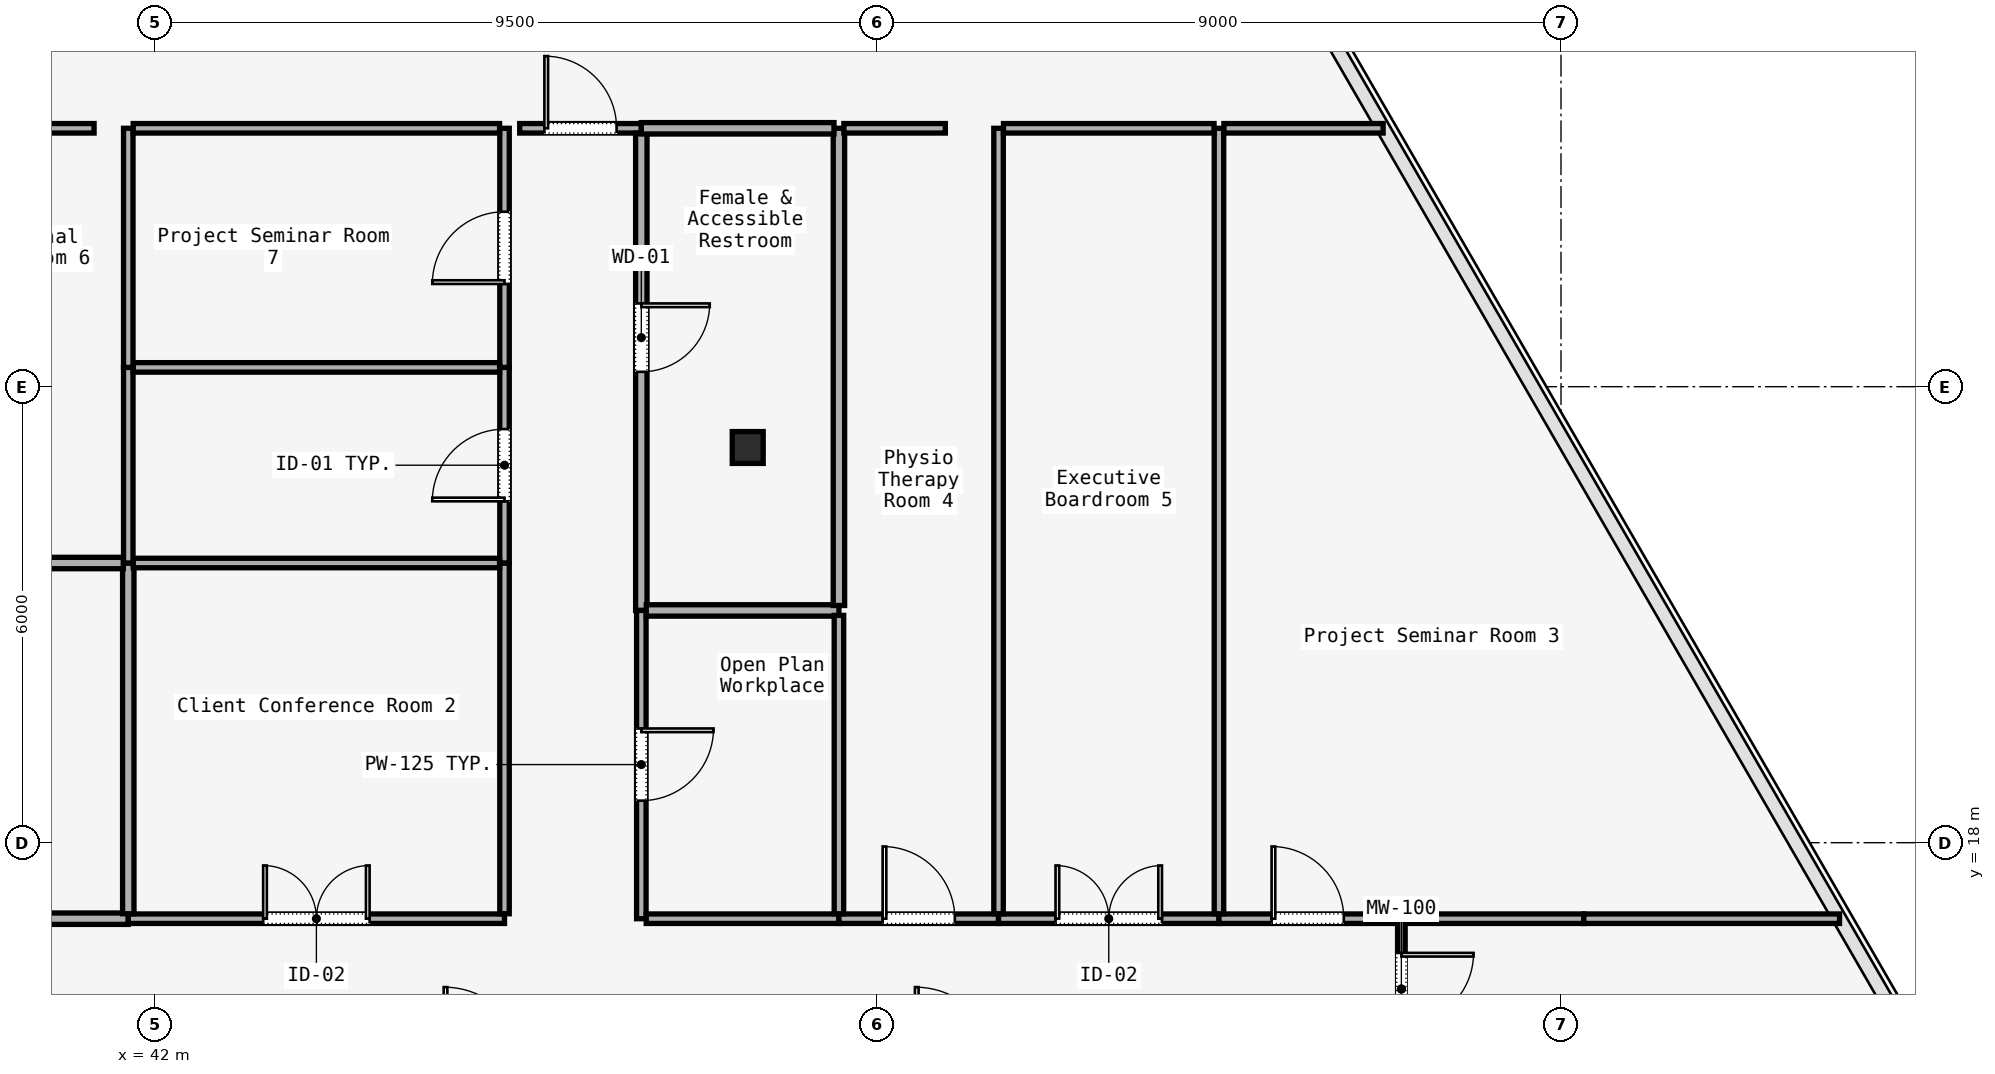
"""IFC4 building model, lengths in metres.
Left out: names, types, materials, properties, quantities, classifications, styles, units other than length and angle.
Written with IfcOpenShell. Run it as: python <this file> out.ifc"""

import sys

from ifc_helpers import new_model, si_unit, direction, frame, frame_2d, origin, origin_2d, place, context, subcontext, project, spatial, rectangle, i_section, extrude, element, fill, save


model = new_model("IFC4")
c1 = context("Model", 3, precision=1e-05, world=origin(), true_north=direction((0.0, 1.0)))
c2 = subcontext(c1, "Body", "Model", "MODEL_VIEW")
j1 = project(units=[si_unit("LENGTHUNIT", "METRE"), si_unit("PLANEANGLEUNIT", "RADIAN")], contexts=[c1])
p1 = place(None, origin())
s1 = spatial("IfcSite", under=j1, at=p1, CompositionType="ELEMENT")
p2 = place(p1, origin())
s2 = spatial("IfcBuilding", under=s1, at=p2, CompositionType="ELEMENT")
p3 = place(p2, frame((0.0, 0.0, 165.0)))
s3 = spatial("IfcBuildingStorey", under=s2, at=p3, CompositionType="ELEMENT", Elevation=165.0)
p4 = place(p3, frame((49.8, 23.2, 0.0), z_axis=(0.0, 0.0, 1.0), x_axis=(1.0, 0.0, 0.0)))
e1 = element("IfcColumn", 1, at=p4, inside=s3, PredefinedType="COLUMN", context=c2, shape_type="SweptSolid", body=[
    extrude(i_section(OverallWidth=0.407, OverallDepth=0.419, WebThickness=0.031, FlangeThickness=0.049, FilletRadius=0.015, at=origin_2d()), origin(), (0.0, 0.0, 1.0), 3.58),
])
p5 = place(p3, frame((58.4, 17.0, 0.0), z_axis=(0.0, 0.0, 1.0), x_axis=(0.0, -1.0, 0.0)))
e2 = element("IfcWall", 2, at=p5, inside=s3, PredefinedType="MOVABLE", context=c2, shape_type="SweptSolid", body=[
    extrude(rectangle(XDim=1.85, YDim=0.1, at=frame_2d((0.925, 0.0))), origin(), (0.0, 0.0, 1.0), 3.01),
])
p6 = place(p5, frame((0.45, 0.0, 0.0)))
e3 = element("IfcOpeningElement", 3, at=p6, cuts=e2, PredefinedType="OPENING", context=c2, shape_type="SweptSolid", body=[
    extrude(rectangle(XDim=0.95, YDim=2.2, at=frame_2d((0.475, 1.1))), frame((0.0, 0.05, 0.0), z_axis=(0.0, -1.0, 0.0), x_axis=(1.0, 0.0, 0.0)), (0.0, 0.0, 1.0), 0.1),
])
p7 = place(p3, frame((37.665, 17.0, 0.0), z_axis=(0.0, 0.0, 1.0), x_axis=(1.0, 0.0, 0.0)))
e4 = element("IfcWall", 4, at=p7, inside=s3, PredefinedType="PARTITIONING", context=c2, shape_type="SweptSolid", body=[
    extrude(rectangle(XDim=3.985, YDim=0.15, at=frame_2d((1.992, 0.0))), origin(), (0.0, 0.0, 1.0), 3.01),
])
p8 = place(p3, frame((41.65, 17.0, 0.0), z_axis=(0.0, 0.0, 1.0), x_axis=(1.0, 0.0, 0.0)))
e5 = element("IfcWall", 5, at=p8, inside=s3, PredefinedType="PARTITIONING", context=c2, shape_type="SweptSolid", body=[
    extrude(rectangle(XDim=4.95, YDim=0.125, at=frame_2d((2.475, 0.0))), origin(), (0.0, 0.0, 1.0), 3.01),
])
p9 = place(p8, frame((1.775, 0.0, 0.0)))
e6 = element("IfcOpeningElement", 6, at=p9, cuts=e5, PredefinedType="OPENING", context=c2, shape_type="SweptSolid", body=[
    extrude(rectangle(XDim=1.4, YDim=2.2, at=frame_2d((0.7, 1.1))), frame((0.0, 0.062, 0.0), z_axis=(0.0, -1.0, 0.0), x_axis=(1.0, 0.0, 0.0)), (0.0, 0.0, 1.0), 0.125),
])
p10 = place(p3, frame((46.6, 17.065, 0.0), z_axis=(0.0, 0.0, 1.0), x_axis=(0.0, 1.0, 0.0)))
e7 = element("IfcWall", 7, at=p10, inside=s3, PredefinedType="PARTITIONING", context=c2, shape_type="SweptSolid", body=[
    extrude(rectangle(XDim=4.615, YDim=0.125, at=frame_2d((2.308, 0.0))), origin(), (0.0, 0.0, 1.0), 3.01),
])
p11 = place(p3, frame((46.6, 21.68, 0.0), z_axis=(0.0, 0.0, 1.0), x_axis=(0.0, 1.0, 0.0)))
e8 = element("IfcWall", 8, at=p11, inside=s3, PredefinedType="PARTITIONING", context=c2, shape_type="SweptSolid", body=[
    extrude(rectangle(XDim=2.574, YDim=0.125, at=frame_2d((1.287, 0.0))), origin(), (0.0, 0.0, 1.0), 3.01),
])
p12 = place(p11, frame((0.812, 0.0, 0.0)))
e9 = element("IfcOpeningElement", 9, at=p12, cuts=e8, PredefinedType="OPENING", context=c2, shape_type="SweptSolid", body=[
    extrude(rectangle(XDim=0.95, YDim=2.2, at=frame_2d((0.475, 1.1))), frame((0.0, 0.062, 0.0), z_axis=(0.0, -1.0, 0.0), x_axis=(1.0, 0.0, 0.0)), (0.0, 0.0, 1.0), 0.125),
])
p13 = place(p3, frame((46.6, 24.254, 0.0), z_axis=(0.0, 0.0, 1.0), x_axis=(0.0, 1.0, 0.0)))
e10 = element("IfcWall", 10, at=p13, inside=s3, PredefinedType="PARTITIONING", context=c2, shape_type="SweptSolid", body=[
    extrude(rectangle(XDim=3.146, YDim=0.125, at=frame_2d((1.573, 0.0))), origin(), (0.0, 0.0, 1.0), 3.01),
])
p14 = place(p13, frame((1.098, 0.0, 0.0)))
e11 = element("IfcOpeningElement", 11, at=p14, cuts=e10, PredefinedType="OPENING", context=c2, shape_type="SweptSolid", body=[
    extrude(rectangle(XDim=0.95, YDim=2.2, at=frame_2d((0.475, 1.1))), frame((0.0, 0.062, 0.0), z_axis=(0.0, -1.0, 0.0), x_axis=(1.0, 0.0, 0.0)), (0.0, 0.0, 1.0), 0.125),
])
p15 = place(p3, frame((46.8, 27.4, 0.0), z_axis=(0.0, 0.0, 1.0), x_axis=(1.0, 0.0, 0.0)))
e12 = element("IfcWall", 12, at=p15, inside=s3, PredefinedType="PARTITIONING", context=c2, shape_type="SweptSolid", body=[
    extrude(rectangle(XDim=1.6, YDim=0.125, at=frame_2d((0.8, 0.0))), origin(), (0.0, 0.0, 1.0), 3.01),
])
p16 = place(p15, frame((0.325, 0.0, 0.0)))
e13 = element("IfcOpeningElement", 13, at=p16, cuts=e12, PredefinedType="OPENING", context=c2, shape_type="SweptSolid", body=[
    extrude(rectangle(XDim=0.95, YDim=2.2, at=frame_2d((0.475, 1.1))), frame((0.0, 0.062, 0.0), z_axis=(0.0, -1.0, 0.0), x_axis=(1.0, 0.0, 0.0)), (0.0, 0.0, 1.0), 0.125),
])
p17 = place(p3, frame((48.4, 27.335, 0.0), z_axis=(0.0, 0.0, 1.0), x_axis=(0.0, -1.0, 0.0)))
e14 = element("IfcWall", 14, at=p17, inside=s3, PredefinedType="PARTITIONING", context=c2, shape_type="SweptSolid", body=[
    extrude(rectangle(XDim=6.279, YDim=0.15, at=frame_2d((3.14, 0.0))), origin(), (0.0, 0.0, 1.0), 3.01),
])
p18 = place(p17, frame((2.24, 0.0, 0.0)))
e15 = element("IfcOpeningElement", 15, at=p18, cuts=e14, PredefinedType="OPENING", context=c2, shape_type="SweptSolid", body=[
    extrude(rectangle(XDim=0.9, YDim=2.15, at=frame_2d((0.45, 1.075))), frame((0.0, 0.075, 0.0), z_axis=(0.0, -1.0, 0.0), x_axis=(1.0, 0.0, 0.0)), (0.0, 0.0, 1.0), 0.15),
])
p19 = place(p3, frame((48.4, 21.056, 0.0), z_axis=(0.0, 0.0, 1.0), x_axis=(0.0, -1.0, 0.0)))
e16 = element("IfcWall", 16, at=p19, inside=s3, PredefinedType="PARTITIONING", context=c2, shape_type="SweptSolid", body=[
    extrude(rectangle(XDim=4.056, YDim=0.125, at=frame_2d((2.028, 0.0))), origin(), (0.0, 0.0, 1.0), 3.01),
])
p20 = place(p19, frame((1.553, 0.0, 0.0)))
e17 = element("IfcOpeningElement", 17, at=p20, cuts=e16, PredefinedType="OPENING", context=c2, shape_type="SweptSolid", body=[
    extrude(rectangle(XDim=0.95, YDim=2.2, at=frame_2d((0.475, 1.1))), frame((0.0, 0.062, 0.0), z_axis=(0.0, -1.0, 0.0), x_axis=(1.0, 0.0, 0.0)), (0.0, 0.0, 1.0), 0.125),
])
p21 = place(p3, frame((48.465, 17.0, 0.0), z_axis=(0.0, 0.0, 1.0), x_axis=(1.0, 0.0, 0.0)))
e18 = element("IfcWall", 18, at=p21, inside=s3, PredefinedType="PARTITIONING", context=c2, shape_type="SweptSolid", body=[
    extrude(rectangle(XDim=2.535, YDim=0.125, at=frame_2d((1.268, 0.0))), origin(), (0.0, 0.0, 1.0), 3.01),
])
p22 = place(p3, frame((51.0, 17.0, 0.0), z_axis=(0.0, 0.0, 1.0), x_axis=(1.0, 0.0, 0.0)))
e19 = element("IfcWall", 19, at=p22, inside=s3, PredefinedType="PARTITIONING", context=c2, shape_type="SweptSolid", body=[
    extrude(rectangle(XDim=2.1, YDim=0.125, at=frame_2d((1.05, 0.0))), origin(), (0.0, 0.0, 1.0), 3.01),
])
p23 = place(p22, frame((0.575, 0.0, 0.0)))
e20 = element("IfcOpeningElement", 20, at=p23, cuts=e19, PredefinedType="OPENING", context=c2, shape_type="SweptSolid", body=[
    extrude(rectangle(XDim=0.95, YDim=2.2, at=frame_2d((0.475, 1.1))), frame((0.0, 0.062, 0.0), z_axis=(0.0, -1.0, 0.0), x_axis=(1.0, 0.0, 0.0)), (0.0, 0.0, 1.0), 0.125),
])
p24 = place(p3, frame((53.1, 17.0, 0.0), z_axis=(0.0, 0.0, 1.0), x_axis=(1.0, 0.0, 0.0)))
e21 = element("IfcWall", 21, at=p24, inside=s3, PredefinedType="PARTITIONING", context=c2, shape_type="SweptSolid", body=[
    extrude(rectangle(XDim=2.9, YDim=0.125, at=frame_2d((1.45, 0.0))), origin(), (0.0, 0.0, 1.0), 3.01),
])
p25 = place(p24, frame((0.75, 0.0, 0.0)))
e22 = element("IfcOpeningElement", 22, at=p25, cuts=e21, PredefinedType="OPENING", context=c2, shape_type="SweptSolid", body=[
    extrude(rectangle(XDim=1.4, YDim=2.2, at=frame_2d((0.7, 1.1))), frame((0.0, 0.062, 0.0), z_axis=(0.0, -1.0, 0.0), x_axis=(1.0, 0.0, 0.0)), (0.0, 0.0, 1.0), 0.125),
])
p26 = place(p3, frame((56.0, 17.0, 0.0), z_axis=(0.0, 0.0, 1.0), x_axis=(1.0, 0.0, 0.0)))
e23 = element("IfcWall", 23, at=p26, inside=s3, PredefinedType="PARTITIONING", context=c2, shape_type="SweptSolid", body=[
    extrude(rectangle(XDim=2.335, YDim=0.125, at=frame_2d((1.167, 0.0))), origin(), (0.0, 0.0, 1.0), 3.01),
])
p27 = place(p26, frame((0.692, 0.0, 0.0)))
e24 = element("IfcOpeningElement", 24, at=p27, cuts=e23, PredefinedType="OPENING", context=c2, shape_type="SweptSolid", body=[
    extrude(rectangle(XDim=0.95, YDim=2.2, at=frame_2d((0.475, 1.1))), frame((0.0, 0.062, 0.0), z_axis=(0.0, -1.0, 0.0), x_axis=(1.0, 0.0, 0.0)), (0.0, 0.0, 1.0), 0.125),
])
p28 = place(p3, frame((58.465, 17.0, 0.0), z_axis=(0.0, 0.0, 1.0), x_axis=(1.0, 0.0, 0.0)))
e25 = element("IfcWall", 25, at=p28, inside=s3, PredefinedType="PARTITIONING", context=c2, shape_type="SweptSolid", body=[
    extrude(rectangle(XDim=2.335, YDim=0.125, at=frame_2d((1.167, 0.0))), origin(), (0.0, 0.0, 1.0), 3.01),
])
p29 = place(p3, frame((60.8, 17.0, 0.0), z_axis=(0.0, 0.0, 1.0), x_axis=(1.0, 0.0, 0.0)))
e26 = element("IfcWall", 26, at=p29, inside=s3, PredefinedType="PARTITIONING", context=c2, shape_type="SweptSolid", body=[
    extrude(rectangle(XDim=3.365, YDim=0.125, at=frame_2d((1.682, 0.0))), origin(), (0.0, 0.0, 1.0), 3.01),
])
p30 = place(p3, frame((48.465, 21.056, 0.0), z_axis=(0.0, 0.0, 1.0), x_axis=(1.0, 0.0, 0.0)))
e27 = element("IfcWall", 27, at=p30, inside=s3, PredefinedType="PARTITIONING", context=c2, shape_type="SweptSolid", body=[
    extrude(rectangle(XDim=2.535, YDim=0.15, at=frame_2d((1.268, 0.0))), origin(), (0.0, 0.0, 1.0), 3.01),
])
p31 = place(p3, frame((51.0, 20.991, 0.0), z_axis=(0.0, 0.0, 1.0), x_axis=(0.0, -1.0, 0.0)))
e28 = element("IfcWall", 28, at=p31, inside=s3, PredefinedType="PARTITIONING", context=c2, shape_type="SweptSolid", body=[
    extrude(rectangle(XDim=3.926, YDim=0.125, at=frame_2d((1.963, 0.0))), origin(), (0.0, 0.0, 1.0), 3.01),
])
p32 = place(p3, frame((41.65, 21.68, 0.0), z_axis=(0.0, 0.0, 1.0), x_axis=(0.0, -1.0, 0.0)))
e29 = element("IfcWall", 29, at=p32, inside=s3, PredefinedType="PARTITIONING", context=c2, shape_type="SweptSolid", body=[
    extrude(rectangle(XDim=4.615, YDim=0.15, at=frame_2d((2.308, 0.0))), origin(), (0.0, 0.0, 1.0), 3.01),
])
p33 = place(p3, frame((37.665, 21.68, 0.0), z_axis=(0.0, 0.0, 1.0), x_axis=(1.0, 0.0, 0.0)))
e30 = element("IfcWall", 30, at=p33, inside=s3, PredefinedType="PARTITIONING", context=c2, shape_type="SweptSolid", body=[
    extrude(rectangle(XDim=3.92, YDim=0.15, at=frame_2d((1.96, 0.0))), origin(), (0.0, 0.0, 1.0), 3.01),
])
p34 = place(p3, frame((41.715, 21.68, 0.0), z_axis=(0.0, 0.0, 1.0), x_axis=(1.0, 0.0, 0.0)))
e31 = element("IfcWall", 31, at=p34, inside=s3, PredefinedType="PARTITIONING", context=c2, shape_type="SweptSolid", body=[
    extrude(rectangle(XDim=4.82, YDim=0.125, at=frame_2d((2.41, 0.0))), origin(), (0.0, 0.0, 1.0), 3.01),
])
p35 = place(p3, frame((56.0, 17.065, 0.0), z_axis=(0.0, 0.0, 1.0), x_axis=(0.0, 1.0, 0.0)))
e32 = element("IfcWall", 32, at=p35, inside=s3, PredefinedType="PARTITIONING", context=c2, shape_type="SweptSolid", body=[
    extrude(rectangle(XDim=10.335, YDim=0.125, at=frame_2d((5.167, 0.0))), origin(), (0.0, 0.0, 1.0), 3.01),
])
p36 = place(p3, frame((56.065, 27.4, 0.0), z_axis=(0.0, 0.0, 1.0), x_axis=(1.0, 0.0, 0.0)))
e33 = element("IfcWall", 33, at=p36, inside=s3, PredefinedType="PARTITIONING", context=c2, shape_type="SweptSolid", body=[
    extrude(rectangle(XDim=2.095, YDim=0.125, at=frame_2d((1.048, 0.0))), origin(), (0.0, 0.0, 1.0), 3.01),
])
p37 = place(p3, frame((51.0, 21.121, 0.0), z_axis=(0.0, 0.0, 1.0), x_axis=(0.0, 1.0, 0.0)))
e34 = element("IfcWall", 34, at=p37, inside=s3, PredefinedType="PARTITIONING", context=c2, shape_type="SweptSolid", body=[
    extrude(rectangle(XDim=6.279, YDim=0.15, at=frame_2d((3.139, 0.0))), origin(), (0.0, 0.0, 1.0), 3.01),
])
p38 = place(p3, frame((51.065, 27.4, 0.0), z_axis=(0.0, 0.0, 1.0), x_axis=(1.0, 0.0, 0.0)))
e35 = element("IfcWall", 35, at=p38, inside=s3, PredefinedType="PARTITIONING", context=c2, shape_type="SweptSolid", body=[
    extrude(rectangle(XDim=1.335, YDim=0.125, at=frame_2d((0.667, 0.0))), origin(), (0.0, 0.0, 1.0), 3.01),
])
p39 = place(p3, frame((53.1, 27.4, 0.0), z_axis=(0.0, 0.0, 1.0), x_axis=(0.0, -1.0, 0.0)))
e36 = element("IfcWall", 36, at=p39, inside=s3, PredefinedType="PARTITIONING", context=c2, shape_type="SweptSolid", body=[
    extrude(rectangle(XDim=10.335, YDim=0.125, at=frame_2d((5.167, 0.0))), origin(), (0.0, 0.0, 1.0), 3.01),
])
p40 = place(p3, frame((53.165, 27.4, 0.0), z_axis=(0.0, 0.0, 1.0), x_axis=(1.0, 0.0, 0.0)))
e37 = element("IfcWall", 37, at=p40, inside=s3, PredefinedType="PARTITIONING", context=c2, shape_type="SweptSolid", body=[
    extrude(rectangle(XDim=2.77, YDim=0.125, at=frame_2d((1.385, 0.0))), origin(), (0.0, 0.0, 1.0), 3.01),
])
p41 = place(p3, frame((41.65, 21.68, 0.0), z_axis=(0.0, 0.0, 1.0), x_axis=(0.0, 1.0, 0.0)))
e38 = element("IfcWall", 38, at=p41, inside=s3, PredefinedType="PARTITIONING", context=c2, shape_type="SweptSolid", body=[
    extrude(rectangle(XDim=2.574, YDim=0.125, at=frame_2d((1.287, 0.0))), origin(), (0.0, 0.0, 1.0), 3.01),
])
p42 = place(p3, frame((41.715, 24.254, 0.0), z_axis=(0.0, 0.0, 1.0), x_axis=(1.0, 0.0, 0.0)))
e39 = element("IfcWall", 39, at=p42, inside=s3, PredefinedType="PARTITIONING", context=c2, shape_type="SweptSolid", body=[
    extrude(rectangle(XDim=4.82, YDim=0.125, at=frame_2d((2.41, 0.0))), origin(), (0.0, 0.0, 1.0), 3.01),
])
p43 = place(p3, frame((48.4, 27.4, 0.0), z_axis=(0.0, 0.0, 1.0), x_axis=(1.0, 0.0, 0.0)))
e40 = element("IfcWall", 40, at=p43, inside=s3, PredefinedType="PARTITIONING", context=c2, shape_type="SweptSolid", body=[
    extrude(rectangle(XDim=2.535, YDim=0.15, at=frame_2d((1.268, 0.0))), origin(), (0.0, 0.0, 1.0), 3.01),
])
p44 = place(p3, frame((41.65, 27.4, 0.0), z_axis=(0.0, 0.0, 1.0), x_axis=(0.0, -1.0, 0.0)))
e41 = element("IfcWall", 41, at=p44, inside=s3, PredefinedType="PARTITIONING", context=c2, shape_type="SweptSolid", body=[
    extrude(rectangle(XDim=3.146, YDim=0.125, at=frame_2d((1.573, 0.0))), origin(), (0.0, 0.0, 1.0), 3.01),
])
p45 = place(p3, frame((38.445, 27.4, 0.0), z_axis=(0.0, 0.0, 1.0), x_axis=(1.0, 0.0, 0.0)))
e42 = element("IfcWall", 42, at=p45, inside=s3, PredefinedType="PARTITIONING", context=c2, shape_type="SweptSolid", body=[
    extrude(rectangle(XDim=2.755, YDim=0.125, at=frame_2d((1.377, 0.0))), origin(), (0.0, 0.0, 1.0), 3.01),
])
p46 = place(p3, frame((41.715, 27.4, 0.0), z_axis=(0.0, 0.0, 1.0), x_axis=(1.0, 0.0, 0.0)))
e43 = element("IfcWall", 43, at=p46, inside=s3, PredefinedType="PARTITIONING", context=c2, shape_type="SweptSolid", body=[
    extrude(rectangle(XDim=4.82, YDim=0.125, at=frame_2d((2.41, 0.0))), origin(), (0.0, 0.0, 1.0), 3.01),
])
p47 = place(p6, origin())
e44 = element("IfcDoor", 44, at=p47, inside=s3, OperationType="SINGLE_SWING_LEFT", PredefinedType="DOOR", context=c2, shape_type="SweptSolid", body=[
    extrude(rectangle(XDim=0.95, YDim=2.2, at=frame_2d((0.475, 1.1))), frame((0.0, 0.025, 0.0), z_axis=(0.0, -1.0, 0.0), x_axis=(1.0, 0.0, 0.0)), (0.0, 0.0, 1.0), 0.05),
])
fill(e3, e44)
p48 = place(p20, origin())
e45 = element("IfcDoor", 45, at=p48, inside=s3, OperationType="SINGLE_SWING_RIGHT", PredefinedType="DOOR", context=c2, shape_type="SweptSolid", body=[
    extrude(rectangle(XDim=0.95, YDim=2.2, at=frame_2d((0.475, 1.1))), frame((0.0, 0.025, 0.0), z_axis=(0.0, -1.0, 0.0), x_axis=(1.0, 0.0, 0.0)), (0.0, 0.0, 1.0), 0.05),
])
fill(e17, e45)
p49 = place(p9, origin())
e46 = element("IfcDoor", 46, at=p49, inside=s3, OperationType="SINGLE_SWING_LEFT", PredefinedType="DOOR", context=c2, shape_type="SweptSolid", body=[
    extrude(rectangle(XDim=1.4, YDim=2.2, at=frame_2d((0.7, 1.1))), frame((0.0, 0.025, 0.0), z_axis=(0.0, -1.0, 0.0), x_axis=(1.0, 0.0, 0.0)), (0.0, 0.0, 1.0), 0.05),
])
fill(e6, e46)
p50 = place(p27, origin())
e47 = element("IfcDoor", 47, at=p50, inside=s3, OperationType="SINGLE_SWING_RIGHT", PredefinedType="DOOR", context=c2, shape_type="SweptSolid", body=[
    extrude(rectangle(XDim=0.95, YDim=2.2, at=frame_2d((0.475, 1.1))), frame((0.0, 0.025, 0.0), z_axis=(0.0, -1.0, 0.0), x_axis=(1.0, 0.0, 0.0)), (0.0, 0.0, 1.0), 0.05),
])
fill(e24, e47)
p51 = place(p23, origin())
e48 = element("IfcDoor", 48, at=p51, inside=s3, OperationType="SINGLE_SWING_RIGHT", PredefinedType="DOOR", context=c2, shape_type="SweptSolid", body=[
    extrude(rectangle(XDim=0.95, YDim=2.2, at=frame_2d((0.475, 1.1))), frame((0.0, 0.025, 0.0), z_axis=(0.0, -1.0, 0.0), x_axis=(1.0, 0.0, 0.0)), (0.0, 0.0, 1.0), 0.05),
])
fill(e20, e48)
p52 = place(p25, origin())
e49 = element("IfcDoor", 49, at=p52, inside=s3, OperationType="SINGLE_SWING_LEFT", PredefinedType="DOOR", context=c2, shape_type="SweptSolid", body=[
    extrude(rectangle(XDim=1.4, YDim=2.2, at=frame_2d((0.7, 1.1))), frame((0.0, 0.025, 0.0), z_axis=(0.0, -1.0, 0.0), x_axis=(1.0, 0.0, 0.0)), (0.0, 0.0, 1.0), 0.05),
])
fill(e22, e49)
p53 = place(p12, origin())
e50 = element("IfcDoor", 50, at=p53, inside=s3, OperationType="SINGLE_SWING_RIGHT", PredefinedType="DOOR", context=c2, shape_type="SweptSolid", body=[
    extrude(rectangle(XDim=0.95, YDim=2.2, at=frame_2d((0.475, 1.1))), frame((0.0, 0.025, 0.0), z_axis=(0.0, -1.0, 0.0), x_axis=(1.0, 0.0, 0.0)), (0.0, 0.0, 1.0), 0.05),
])
fill(e9, e50)
p54 = place(p18, origin())
e51 = element("IfcDoor", 51, at=p54, inside=s3, OperationType="SINGLE_SWING_LEFT", PredefinedType="DOOR", context=c2, shape_type="SweptSolid", body=[
    extrude(rectangle(XDim=0.9, YDim=2.15, at=frame_2d((0.45, 1.075))), frame((0.0, 0.025, 0.0), z_axis=(0.0, -1.0, 0.0), x_axis=(1.0, 0.0, 0.0)), (0.0, 0.0, 1.0), 0.05),
])
fill(e15, e51)
p55 = place(p14, origin())
e52 = element("IfcDoor", 52, at=p55, inside=s3, OperationType="SINGLE_SWING_RIGHT", PredefinedType="DOOR", context=c2, shape_type="SweptSolid", body=[
    extrude(rectangle(XDim=0.95, YDim=2.2, at=frame_2d((0.475, 1.1))), frame((0.0, 0.025, 0.0), z_axis=(0.0, -1.0, 0.0), x_axis=(1.0, 0.0, 0.0)), (0.0, 0.0, 1.0), 0.05),
])
fill(e11, e52)
p56 = place(p16, origin())
e53 = element("IfcDoor", 53, at=p56, inside=s3, OperationType="SINGLE_SWING_RIGHT", PredefinedType="DOOR", context=c2, shape_type="SweptSolid", body=[
    extrude(rectangle(XDim=0.95, YDim=2.2, at=frame_2d((0.475, 1.1))), frame((0.0, 0.025, 0.0), z_axis=(0.0, -1.0, 0.0), x_axis=(1.0, 0.0, 0.0)), (0.0, 0.0, 1.0), 0.05),
])
fill(e13, e53)
save(model, sys.argv[1])
